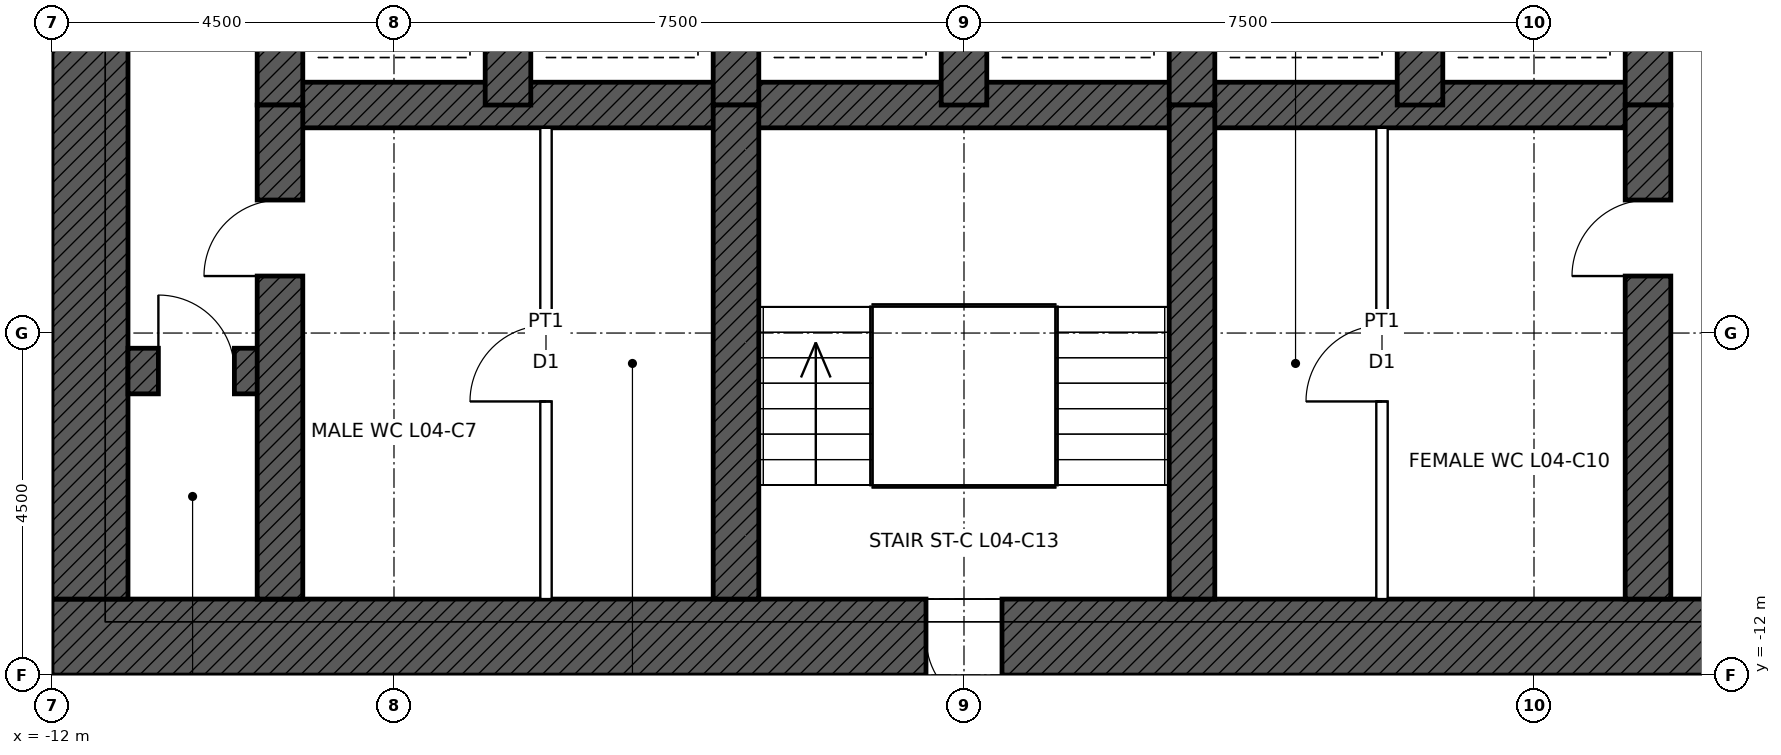
"""IFC4 building model, lengths in metres.
Left out: names, types, materials, properties, quantities, classifications, styles, units other than length and angle.
Written with IfcOpenShell. Run it as: python <this file> out.ifc"""

import sys

from ifc_helpers import new_model, si_unit, direction, frame, frame_2d, origin, place, context, subcontext, project, spatial, rectangle, extrude, element, fill, save


model = new_model("IFC4")
c1 = context("Model", 3, precision=1e-05, world=origin(), true_north=direction((0.0, 1.0)))
c2 = subcontext(c1, "Body", "Model", "MODEL_VIEW")
j1 = project(units=[si_unit("LENGTHUNIT", "METRE"), si_unit("PLANEANGLEUNIT", "RADIAN")], contexts=[c1])
p1 = place(None, origin())
s1 = spatial("IfcSite", under=j1, at=p1, CompositionType="ELEMENT")
p2 = place(p1, origin())
s2 = spatial("IfcBuilding", under=s1, at=p2, CompositionType="ELEMENT")
p3 = place(p2, frame((0.0, 0.0, 23.4)))
s3 = spatial("IfcBuildingStorey", under=s2, at=p3, CompositionType="ELEMENT", Elevation=23.4)
p4 = place(p3, frame((12.0, -11.5, 0.0), z_axis=(0.0, 0.0, 1.0), x_axis=(-1.0, 0.0, 0.0)))
e1 = element("IfcWall", 1, at=p4, inside=s3, PredefinedType="SHEAR", context=c2, shape_type="SweptSolid", body=[
    extrude(rectangle(XDim=24.0, YDim=1.0, at=frame_2d((12.0, 0.0))), origin(), (0.0, 0.0, 1.0), 5.0),
])
p5 = place(p4, frame((11.5, 0.0, 0.0)))
e2 = element("IfcOpeningElement", 2, at=p5, cuts=e1, PredefinedType="OPENING", context=c2, shape_type="SweptSolid", body=[
    extrude(rectangle(XDim=1.0, YDim=2.1, at=frame_2d((0.5, 1.05))), frame((0.0, 0.51, 0.0), z_axis=(0.0, -1.0, 0.0), x_axis=(1.0, 0.0, 0.0)), (0.0, 0.0, 1.0), 1.02),
])
p6 = place(p4, frame((1.0, 0.0, 0.0)))
e3 = element("IfcOpeningElement", 3, at=p6, cuts=e1, PredefinedType="OPENING", context=c2, shape_type="SweptSolid", body=[
    extrude(rectangle(XDim=1.0, YDim=2.4, at=frame_2d((0.5, 1.2))), frame((0.0, 0.51, 0.0), z_axis=(0.0, -1.0, 0.0), x_axis=(1.0, 0.0, 0.0)), (0.0, 0.0, 1.0), 1.02),
])
p7 = place(p3, frame((-11.5, -11.0, 0.0), z_axis=(0.0, 0.0, 1.0), x_axis=(0.0, 1.0, 0.0)))
e4 = element("IfcWall", 4, at=p7, inside=s3, PredefinedType="SHEAR", context=c2, shape_type="SweptSolid", body=[
    extrude(rectangle(XDim=22.0, YDim=1.0, at=frame_2d((11.0, 0.0))), origin(), (0.0, 0.0, 1.0), 5.0),
])
p8 = place(p7, frame((10.5, 0.0, 0.0)))
e5 = element("IfcOpeningElement", 5, at=p8, cuts=e4, PredefinedType="OPENING", context=c2, shape_type="SweptSolid", body=[
    extrude(rectangle(XDim=1.0, YDim=2.4, at=frame_2d((0.5, 1.2))), frame((0.0, 0.51, 0.0), z_axis=(0.0, -1.0, 0.0), x_axis=(1.0, 0.0, 0.0)), (0.0, 0.0, 1.0), 1.02),
])
p9 = place(p3, frame((-9.0, -4.5, 0.0), z_axis=(0.0, 0.0, 1.0), x_axis=(1.0, 0.0, 0.0)))
e6 = element("IfcWall", 6, at=p9, inside=s3, PredefinedType="SHEAR", context=c2, shape_type="SweptSolid", body=[
    extrude(rectangle(XDim=18.0, YDim=0.6, at=frame_2d((9.0, 0.0))), origin(), (0.0, 0.0, 1.0), 5.0),
])
p10 = place(p3, frame((-11.0, -8.0, 0.0), z_axis=(0.0, 0.0, 1.0), x_axis=(1.0, 0.0, 0.0)))
e7 = element("IfcWall", 7, at=p10, inside=s3, PredefinedType="SHEAR", context=c2, shape_type="SweptSolid", body=[
    extrude(rectangle(XDim=2.0, YDim=0.6, at=frame_2d((1.0, 0.0))), origin(), (0.0, 0.0, 1.0), 5.0),
])
p11 = place(p10, frame((0.4, 0.0, 0.0)))
e8 = element("IfcOpeningElement", 8, at=p11, cuts=e7, PredefinedType="OPENING", context=c2, shape_type="SweptSolid", body=[
    extrude(rectangle(XDim=1.0, YDim=2.1, at=frame_2d((0.5, 1.05))), frame((0.0, 0.31, 0.0), z_axis=(0.0, -1.0, 0.0), x_axis=(1.0, 0.0, 0.0)), (0.0, 0.0, 1.0), 0.62),
])
for number, where, z_axis, x_axis in (
    (9, (-9.0, -4.5, 0.0), (0.0, 0.0, 1.0), (0.0, 1.0, 0.0)),
    (10, (9.0, -4.5, 0.0), (0.0, 0.0, 1.0), (0.0, 1.0, 0.0)),
    (11, (-6.0, -4.5, 0.0), (0.0, 0.0, 1.0), (0.0, 1.0, 0.0)),
    (12, (-3.0, -4.5, 0.0), (0.0, 0.0, 1.0), (0.0, 1.0, 0.0)),
    (13, (0.0, -4.5, 0.0), (0.0, 0.0, 1.0), (0.0, 1.0, 0.0)),
    (14, (3.0, -4.5, 0.0), (0.0, 0.0, 1.0), (0.0, 1.0, 0.0)),
    (15, (6.0, -4.5, 0.0), (0.0, 0.0, 1.0), (0.0, 1.0, 0.0)),
):
    element("IfcWall", number, at=place(p3, frame(where, z_axis=z_axis, x_axis=x_axis)), inside=s3, PredefinedType="SHEAR", context=c2, shape_type="SweptSolid", body=[
        extrude(rectangle(XDim=3.0, YDim=0.6, at=frame_2d((1.5, 0.0))), origin(), (0.0, 0.0, 1.0), 5.0),
    ])
p12 = place(p3, frame((-9.0, -11.0, 0.0), z_axis=(0.0, 0.0, 1.0), x_axis=(0.0, 1.0, 0.0)))
e16 = element("IfcWall", 16, at=p12, inside=s3, PredefinedType="SHEAR", context=c2, shape_type="SweptSolid", body=[
    extrude(rectangle(XDim=6.5, YDim=0.6, at=frame_2d((3.25, 0.0))), origin(), (0.0, 0.0, 1.0), 5.0),
])
p13 = place(p12, frame((4.25, 0.0, 0.0)))
e17 = element("IfcOpeningElement", 17, at=p13, cuts=e16, PredefinedType="OPENING", context=c2, shape_type="SweptSolid", body=[
    extrude(rectangle(XDim=1.0, YDim=2.1, at=frame_2d((0.5, 1.05))), frame((0.0, 0.31, 0.0), z_axis=(0.0, -1.0, 0.0), x_axis=(1.0, 0.0, 0.0)), (0.0, 0.0, 1.0), 0.62),
])
p14 = place(p3, frame((9.0, -11.0, 0.0), z_axis=(0.0, 0.0, 1.0), x_axis=(0.0, 1.0, 0.0)))
e18 = element("IfcWall", 18, at=p14, inside=s3, PredefinedType="SHEAR", context=c2, shape_type="SweptSolid", body=[
    extrude(rectangle(XDim=6.5, YDim=0.6, at=frame_2d((3.25, 0.0))), origin(), (0.0, 0.0, 1.0), 5.0),
])
p15 = place(p14, frame((4.25, 0.0, 0.0)))
e19 = element("IfcOpeningElement", 19, at=p15, cuts=e18, PredefinedType="OPENING", context=c2, shape_type="SweptSolid", body=[
    extrude(rectangle(XDim=1.0, YDim=2.1, at=frame_2d((0.5, 1.05))), frame((0.0, 0.31, 0.0), z_axis=(0.0, -1.0, 0.0), x_axis=(1.0, 0.0, 0.0)), (0.0, 0.0, 1.0), 0.62),
])
for number, where, z_axis, x_axis in (
    (20, (-3.0, -11.0, 0.0), (0.0, 0.0, 1.0), (0.0, 1.0, 0.0)),
    (21, (3.0, -11.0, 0.0), (0.0, 0.0, 1.0), (0.0, 1.0, 0.0)),
):
    element("IfcWall", number, at=place(p3, frame(where, z_axis=z_axis, x_axis=x_axis)), inside=s3, PredefinedType="SHEAR", context=c2, shape_type="SweptSolid", body=[
        extrude(rectangle(XDim=6.5, YDim=0.6, at=frame_2d((3.25, 0.0))), origin(), (0.0, 0.0, 1.0), 5.0),
    ])
p16 = place(p3, frame((-5.5, -11.0, 0.0), z_axis=(0.0, 0.0, 1.0), x_axis=(0.0, 1.0, 0.0)))
e22 = element("IfcWall", 22, at=p16, inside=s3, PredefinedType="PARTITIONING", context=c2, shape_type="SweptSolid", body=[
    extrude(rectangle(XDim=6.2, YDim=0.15, at=frame_2d((3.1, 0.0))), origin(), (0.0, 0.0, 1.0), 4.75),
])
p17 = place(p16, frame((2.6, 0.0, 0.0)))
e23 = element("IfcOpeningElement", 23, at=p17, cuts=e22, PredefinedType="OPENING", context=c2, shape_type="SweptSolid", body=[
    extrude(rectangle(XDim=1.0, YDim=2.1, at=frame_2d((0.5, 1.05))), frame((0.0, 0.085, 0.0), z_axis=(0.0, -1.0, 0.0), x_axis=(1.0, 0.0, 0.0)), (0.0, 0.0, 1.0), 0.17),
])
p18 = place(p3, frame((5.5, -11.0, 0.0), z_axis=(0.0, 0.0, 1.0), x_axis=(0.0, 1.0, 0.0)))
e24 = element("IfcWall", 24, at=p18, inside=s3, PredefinedType="PARTITIONING", context=c2, shape_type="SweptSolid", body=[
    extrude(rectangle(XDim=6.2, YDim=0.15, at=frame_2d((3.1, 0.0))), origin(), (0.0, 0.0, 1.0), 4.75),
])
p19 = place(p18, frame((2.6, 0.0, 0.0)))
e25 = element("IfcOpeningElement", 25, at=p19, cuts=e24, PredefinedType="OPENING", context=c2, shape_type="SweptSolid", body=[
    extrude(rectangle(XDim=1.0, YDim=2.1, at=frame_2d((0.5, 1.05))), frame((0.0, 0.085, 0.0), z_axis=(0.0, -1.0, 0.0), x_axis=(1.0, 0.0, 0.0)), (0.0, 0.0, 1.0), 0.17),
])
p20 = place(p5, origin())
e26 = element("IfcDoor", 26, at=p20, inside=s3, OperationType="SINGLE_SWING_LEFT", PredefinedType="DOOR", context=c2, shape_type="SweptSolid", body=[
    extrude(rectangle(XDim=1.0, YDim=2.1, at=frame_2d((0.5, 1.05))), frame((0.0, 0.485, 0.0), z_axis=(0.0, -1.0, 0.0), x_axis=(1.0, 0.0, 0.0)), (0.0, 0.0, 1.0), 0.05),
])
fill(e2, e26)
p21 = place(p13, origin())
e27 = element("IfcDoor", 27, at=p21, inside=s3, OperationType="SINGLE_SWING_LEFT", PredefinedType="DOOR", context=c2, shape_type="SweptSolid", body=[
    extrude(rectangle(XDim=1.0, YDim=2.1, at=frame_2d((0.5, 1.05))), frame((0.0, 0.025, 0.0), z_axis=(0.0, -1.0, 0.0), x_axis=(1.0, 0.0, 0.0)), (0.0, 0.0, 1.0), 0.05),
])
fill(e17, e27)
p22 = place(p15, origin())
e28 = element("IfcDoor", 28, at=p22, inside=s3, OperationType="SINGLE_SWING_LEFT", PredefinedType="DOOR", context=c2, shape_type="SweptSolid", body=[
    extrude(rectangle(XDim=1.0, YDim=2.1, at=frame_2d((0.5, 1.05))), frame((0.0, 0.025, 0.0), z_axis=(0.0, -1.0, 0.0), x_axis=(1.0, 0.0, 0.0)), (0.0, 0.0, 1.0), 0.05),
])
fill(e19, e28)
p23 = place(p11, origin())
e29 = element("IfcDoor", 29, at=p23, inside=s3, OperationType="SINGLE_SWING_LEFT", PredefinedType="DOOR", context=c2, shape_type="SweptSolid", body=[
    extrude(rectangle(XDim=1.0, YDim=2.1, at=frame_2d((0.5, 1.05))), frame((0.0, 0.025, 0.0), z_axis=(0.0, -1.0, 0.0), x_axis=(1.0, 0.0, 0.0)), (0.0, 0.0, 1.0), 0.05),
])
fill(e8, e29)
p24 = place(p17, origin())
e30 = element("IfcDoor", 30, at=p24, inside=s3, OperationType="SINGLE_SWING_LEFT", PredefinedType="DOOR", context=c2, shape_type="SweptSolid", body=[
    extrude(rectangle(XDim=1.0, YDim=2.1, at=frame_2d((0.5, 1.05))), frame((0.0, 0.025, 0.0), z_axis=(0.0, -1.0, 0.0), x_axis=(1.0, 0.0, 0.0)), (0.0, 0.0, 1.0), 0.05),
])
fill(e23, e30)
p25 = place(p19, origin())
e31 = element("IfcDoor", 31, at=p25, inside=s3, OperationType="SINGLE_SWING_LEFT", PredefinedType="DOOR", context=c2, shape_type="SweptSolid", body=[
    extrude(rectangle(XDim=1.0, YDim=2.1, at=frame_2d((0.5, 1.05))), frame((0.0, 0.025, 0.0), z_axis=(0.0, -1.0, 0.0), x_axis=(1.0, 0.0, 0.0)), (0.0, 0.0, 1.0), 0.05),
])
fill(e25, e31)
save(model, sys.argv[1])
